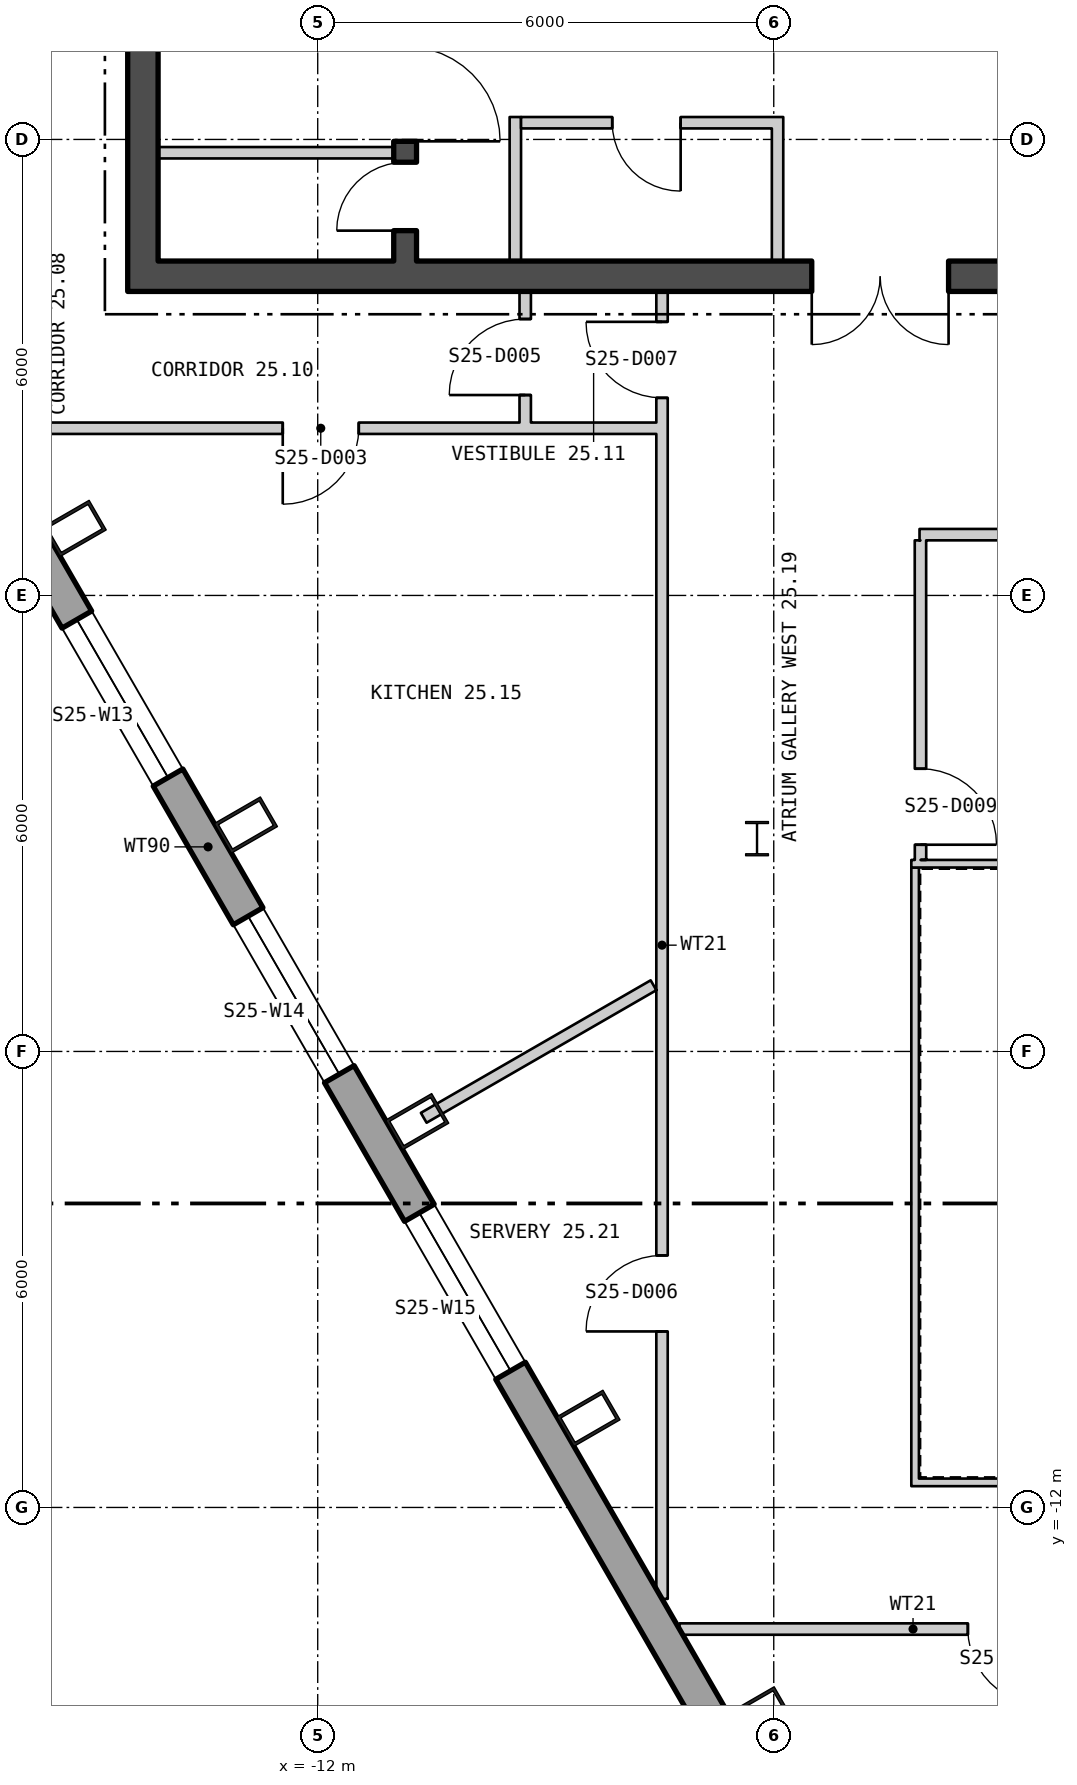
"""IFC4 building model, lengths in metres.
Left out: names, types, materials, properties, quantities, classifications, styles, units other than length and angle.
Written with IfcOpenShell. Run it as: python <this file> out.ifc"""

import sys

from ifc_helpers import new_model, si_unit, direction, frame, frame_2d, origin, origin_2d, place, context, subcontext, project, spatial, polyline, rectangle, hollow_rectangle, i_section, outline, extrude, element, fill, save


model = new_model("IFC4")
c1 = context("Model", 3, precision=1e-05, world=origin(), true_north=direction((0.0, 1.0)))
c2 = subcontext(c1, "Body", "Model", "MODEL_VIEW")
j1 = project(units=[si_unit("LENGTHUNIT", "METRE"), si_unit("PLANEANGLEUNIT", "RADIAN")], contexts=[c1])
p1 = place(None, origin())
s1 = spatial("IfcSite", under=j1, at=p1, CompositionType="ELEMENT")
p2 = place(p1, origin())
s2 = spatial("IfcBuilding", under=s1, at=p2, CompositionType="ELEMENT")
p3 = place(p2, frame((0.0, 0.0, 321.0)))
s3 = spatial("IfcBuildingStorey", under=s2, at=p3, CompositionType="ELEMENT", Elevation=321.0)
for number, where, z_axis, x_axis in (
    (1, (-15.198, 0.882, 0.0), (0.0, 0.0, 1.0), (0.5, -0.866, 0.0)),
    (2, (-12.945, -3.021, 0.0), (0.0, 0.0, 1.0), (0.5, -0.866, 0.0)),
    (3, (-10.691, -6.924, 0.0), (0.0, 0.0, 1.0), (0.5, -0.866, 0.0)),
    (4, (-8.438, -10.827, 0.0), (0.0, 0.0, 1.0), (0.5, -0.866, 0.0)),
    (5, (-6.185, -14.729, 0.0), (0.0, 0.0, 1.0), (0.5, -0.866, 0.0)),
):
    element("IfcColumn", number, at=place(p3, frame(where, z_axis=z_axis, x_axis=x_axis)), inside=s3, PredefinedType="COLUMN", context=c2, shape_type="SweptSolid", body=[
        extrude(hollow_rectangle(XDim=0.45, YDim=0.7, WallThickness=0.04, at=origin_2d()), origin(), (0.0, 0.0, 1.0), 4.2),
    ])
p4 = place(p3, frame((-6.22, -3.2, 0.0), z_axis=(0.0, 0.0, 1.0), x_axis=(1.0, 0.0, 0.0)))
e6 = element("IfcColumn", 6, at=p4, inside=s3, PredefinedType="COLUMN", context=c2, shape_type="SweptSolid", body=[
    extrude(i_section(OverallWidth=0.3, OverallDepth=0.45, WebThickness=0.014, FlangeThickness=0.026, at=origin_2d()), origin(), (0.0, 0.0, 1.0), 4.2),
])
p5 = place(p3, frame((-24.875, 16.493, -0.18), z_axis=(0.0, 0.0, 1.0), x_axis=(0.500000141277, -0.866025322218, 0.0)))
e7 = element("IfcWall", 7, at=p5, inside=s3, PredefinedType="SOLIDWALL", context=c2, shape_type="SweptSolid", body=[
    extrude(outline(polyline([(-0.13, -0.225), (45.86, -0.225), (45.6, 0.225), (0.13, 0.225), (-0.13, -0.225)])), origin(), (0.0, 0.0, 1.0), 3.98),
])
p6 = place(p5, frame((1.424, 0.0, 1.08)))
e8 = element("IfcOpeningElement", 8, at=p6, cuts=e7, PredefinedType="OPENING", context=c2, shape_type="SweptSolid", body=[
    extrude(rectangle(XDim=2.4, YDim=2.3, at=frame_2d((1.2, 1.15))), frame((0.0, 0.235, 0.0), z_axis=(0.0, -1.0, 0.0), x_axis=(1.0, 0.0, 0.0)), (0.0, 0.0, 1.0), 0.47),
])
p7 = place(p5, frame((5.892, 0.0, 1.08)))
e9 = element("IfcOpeningElement", 9, at=p7, cuts=e7, PredefinedType="OPENING", context=c2, shape_type="SweptSolid", body=[
    extrude(rectangle(XDim=2.4, YDim=2.3, at=frame_2d((1.2, 1.15))), frame((0.0, 0.235, 0.0), z_axis=(0.0, -1.0, 0.0), x_axis=(1.0, 0.0, 0.0)), (0.0, 0.0, 1.0), 0.47),
])
p8 = place(p5, frame((10.399, 0.0, 1.08)))
e10 = element("IfcOpeningElement", 10, at=p8, cuts=e7, PredefinedType="OPENING", context=c2, shape_type="SweptSolid", body=[
    extrude(rectangle(XDim=2.4, YDim=2.3, at=frame_2d((1.2, 1.15))), frame((0.0, 0.235, 0.0), z_axis=(0.0, -1.0, 0.0), x_axis=(1.0, 0.0, 0.0)), (0.0, 0.0, 1.0), 0.47),
])
p9 = place(p5, frame((14.905, 0.0, 1.08)))
e11 = element("IfcOpeningElement", 11, at=p9, cuts=e7, PredefinedType="OPENING", context=c2, shape_type="SweptSolid", body=[
    extrude(rectangle(XDim=2.4, YDim=2.3, at=frame_2d((1.2, 1.15))), frame((0.0, 0.235, 0.0), z_axis=(0.0, -1.0, 0.0), x_axis=(1.0, 0.0, 0.0)), (0.0, 0.0, 1.0), 0.47),
])
p10 = place(p5, frame((19.412, 0.0, 1.08)))
e12 = element("IfcOpeningElement", 12, at=p10, cuts=e7, PredefinedType="OPENING", context=c2, shape_type="SweptSolid", body=[
    extrude(rectangle(XDim=2.4, YDim=2.3, at=frame_2d((1.2, 1.15))), frame((0.0, 0.235, 0.0), z_axis=(0.0, -1.0, 0.0), x_axis=(1.0, 0.0, 0.0)), (0.0, 0.0, 1.0), 0.47),
])
p11 = place(p5, frame((23.918, 0.0, 1.08)))
e13 = element("IfcOpeningElement", 13, at=p11, cuts=e7, PredefinedType="OPENING", context=c2, shape_type="SweptSolid", body=[
    extrude(rectangle(XDim=2.4, YDim=2.3, at=frame_2d((1.2, 1.15))), frame((0.0, 0.235, 0.0), z_axis=(0.0, -1.0, 0.0), x_axis=(1.0, 0.0, 0.0)), (0.0, 0.0, 1.0), 0.47),
])
p12 = place(p5, frame((28.425, 0.0, 1.08)))
e14 = element("IfcOpeningElement", 14, at=p12, cuts=e7, PredefinedType="OPENING", context=c2, shape_type="SweptSolid", body=[
    extrude(rectangle(XDim=2.4, YDim=2.3, at=frame_2d((1.2, 1.15))), frame((0.0, 0.235, 0.0), z_axis=(0.0, -1.0, 0.0), x_axis=(1.0, 0.0, 0.0)), (0.0, 0.0, 1.0), 0.47),
])
p13 = place(p5, frame((37.438, 0.0, 1.08)))
e15 = element("IfcOpeningElement", 15, at=p13, cuts=e7, PredefinedType="OPENING", context=c2, shape_type="SweptSolid", body=[
    extrude(rectangle(XDim=2.4, YDim=2.3, at=frame_2d((1.2, 1.15))), frame((0.0, 0.235, 0.0), z_axis=(0.0, -1.0, 0.0), x_axis=(1.0, 0.0, 0.0)), (0.0, 0.0, 1.0), 0.47),
])
p14 = place(p5, frame((41.907, 0.0, 1.08)))
e16 = element("IfcOpeningElement", 16, at=p14, cuts=e7, PredefinedType="OPENING", context=c2, shape_type="SweptSolid", body=[
    extrude(rectangle(XDim=2.4, YDim=2.3, at=frame_2d((1.2, 1.15))), frame((0.0, 0.235, 0.0), z_axis=(0.0, -1.0, 0.0), x_axis=(1.0, 0.0, 0.0)), (0.0, 0.0, 1.0), 0.47),
])
for number, where, z_axis, x_axis in (
    (17, (-4.19, -11.67, 0.0), (0.0, 0.0, 1.0), (1.0, 0.0, 0.0)),
    (18, (4.19, -3.53, 0.0), (0.0, 0.0, 1.0), (-1.0, 0.0, 0.0)),
):
    element("IfcWall", number, at=place(p3, frame(where, z_axis=z_axis, x_axis=x_axis)), inside=s3, PredefinedType="PARTITIONING", context=c2, shape_type="SweptSolid", body=[
        extrude(rectangle(XDim=8.38, YDim=0.1, at=frame_2d((4.19, 0.0))), origin(), (0.0, 0.0, 1.0), 4.0),
    ])
p15 = place(p3, frame((-4.14, -3.58, 0.0), z_axis=(0.0, 0.0, 1.0), x_axis=(0.0, -1.0, 0.0)))
e19 = element("IfcWall", 19, at=p15, inside=s3, PredefinedType="PARTITIONING", context=c2, shape_type="SweptSolid", body=[
    extrude(rectangle(XDim=8.04, YDim=0.1, at=frame_2d((4.02, 0.0))), origin(), (0.0, 0.0, 1.0), 4.0),
])
p16 = place(p3, frame((-14.5, 4.2, 0.0), z_axis=(0.0, 0.0, 1.0), x_axis=(1.0, 0.0, 0.0)))
e20 = element("IfcWall", 20, at=p16, inside=s3, PredefinedType="SHEAR", context=c2, shape_type="SweptSolid", body=[
    extrude(rectangle(XDim=29.0, YDim=0.4, at=frame_2d((14.5, 0.0))), origin(), (0.0, 0.0, 1.0), 4.0),
])
p17 = place(p16, frame((9.0, 0.0, 0.0)))
e21 = element("IfcOpeningElement", 21, at=p17, cuts=e20, PredefinedType="OPENING", context=c2, shape_type="SweptSolid", body=[
    extrude(rectangle(XDim=1.8, YDim=2.4, at=frame_2d((0.9, 1.2))), frame((0.0, 0.21, 0.0), z_axis=(0.0, -1.0, 0.0), x_axis=(1.0, 0.0, 0.0)), (0.0, 0.0, 1.0), 0.42),
])
p18 = place(p16, frame((19.0, 0.0, 0.0)))
e22 = element("IfcOpeningElement", 22, at=p18, cuts=e20, PredefinedType="OPENING", context=c2, shape_type="SweptSolid", body=[
    extrude(rectangle(XDim=1.8, YDim=2.4, at=frame_2d((0.9, 1.2))), frame((0.0, 0.21, 0.0), z_axis=(0.0, -1.0, 0.0), x_axis=(1.0, 0.0, 0.0)), (0.0, 0.0, 1.0), 0.42),
])
p19 = place(p3, frame((-14.3, 4.4, 0.0), z_axis=(0.0, 0.0, 1.0), x_axis=(0.0, 1.0, 0.0)))
e23 = element("IfcWall", 23, at=p19, inside=s3, PredefinedType="SHEAR", context=c2, shape_type="SweptSolid", body=[
    extrude(rectangle(XDim=13.2, YDim=0.4, at=frame_2d((6.6, 0.0))), origin(), (0.0, 0.0, 1.0), 4.0),
])
p20 = place(p19, frame((3.05, 0.0, 0.0)))
e24 = element("IfcOpeningElement", 24, at=p20, cuts=e23, PredefinedType="OPENING", context=c2, shape_type="SweptSolid", body=[
    extrude(rectangle(XDim=1.5, YDim=2.1, at=frame_2d((0.75, 1.05))), frame((0.0, 0.21, 0.0), z_axis=(0.0, -1.0, 0.0), x_axis=(1.0, 0.0, 0.0)), (0.0, 0.0, 1.0), 0.42),
])
p21 = place(p3, frame((-10.85, 4.4, 0.0), z_axis=(0.0, 0.0, 1.0), x_axis=(0.0, 1.0, 0.0)))
e25 = element("IfcWall", 25, at=p21, inside=s3, PredefinedType="SHEAR", context=c2, shape_type="SweptSolid", body=[
    extrude(rectangle(XDim=13.2, YDim=0.3, at=frame_2d((6.6, 0.0))), origin(), (0.0, 0.0, 1.0), 4.0),
])
p22 = place(p21, frame((1.575, 0.0, 0.0)))
e26 = element("IfcOpeningElement", 26, at=p22, cuts=e25, PredefinedType="OPENING", context=c2, shape_type="SweptSolid", body=[
    extrude(rectangle(XDim=1.25, YDim=2.1, at=frame_2d((0.625, 1.05))), frame((0.0, 0.16, 0.0), z_axis=(0.0, -1.0, 0.0), x_axis=(1.0, 0.0, 0.0)), (0.0, 0.0, 1.0), 0.32),
])
p23 = place(p21, frame((0.4, 0.0, 0.0)))
e27 = element("IfcOpeningElement", 27, at=p23, cuts=e25, PredefinedType="OPENING", context=c2, shape_type="SweptSolid", body=[
    extrude(rectangle(XDim=0.9, YDim=2.1, at=frame_2d((0.45, 1.05))), frame((0.0, 0.16, 0.0), z_axis=(0.0, -1.0, 0.0), x_axis=(1.0, 0.0, 0.0)), (0.0, 0.0, 1.0), 0.32),
])
p24 = place(p3, frame((-14.1, 5.825, 0.0), z_axis=(0.0, 0.0, 1.0), x_axis=(1.0, 0.0, 0.0)))
e28 = element("IfcWall", 28, at=p24, inside=s3, PredefinedType="PARTITIONING", context=c2, shape_type="SweptSolid", body=[
    extrude(rectangle(XDim=3.1, YDim=0.15, at=frame_2d((1.55, 0.0))), origin(), (0.0, 0.0, 1.0), 4.0),
])
for number, where, z_axis, x_axis in (
    (29, (-9.4, 4.4, 0.0), (0.0, 0.0, 1.0), (0.0, 1.0, 0.0)),
    (30, (-5.95, 4.4, 0.0), (0.0, 0.0, 1.0), (0.0, 1.0, 0.0)),
):
    element("IfcWall", number, at=place(p3, frame(where, z_axis=z_axis, x_axis=x_axis)), inside=s3, PredefinedType="PARTITIONING", context=c2, shape_type="SweptSolid", body=[
        extrude(rectangle(XDim=1.895, YDim=0.15, at=frame_2d((0.948, 0.0))), origin(), (0.0, 0.0, 1.0), 4.0),
    ])
p25 = place(p3, frame((-9.325, 6.22, 0.0), z_axis=(0.0, 0.0, 1.0), x_axis=(1.0, 0.0, 0.0)))
e31 = element("IfcWall", 31, at=p25, inside=s3, PredefinedType="PARTITIONING", context=c2, shape_type="SweptSolid", body=[
    extrude(rectangle(XDim=3.3, YDim=0.15, at=frame_2d((1.65, 0.0))), origin(), (0.0, 0.0, 1.0), 4.0),
])
p26 = place(p25, frame((1.2, 0.0, 0.0)))
e32 = element("IfcOpeningElement", 32, at=p26, cuts=e31, PredefinedType="OPENING", context=c2, shape_type="SweptSolid", body=[
    extrude(rectangle(XDim=0.9, YDim=2.1, at=frame_2d((0.45, 1.05))), frame((0.0, 0.085, 0.0), z_axis=(0.0, -1.0, 0.0), x_axis=(1.0, 0.0, 0.0)), (0.0, 0.0, 1.0), 0.17),
])
p27 = place(p3, frame((-16.225, 2.2, 0.0), z_axis=(0.0, 0.0, 1.0), x_axis=(1.0, 0.0, 0.0)))
e33 = element("IfcWall", 33, at=p27, inside=s3, PredefinedType="PARTITIONING", context=c2, shape_type="SweptSolid", body=[
    extrude(rectangle(XDim=8.68, YDim=0.15, at=frame_2d((4.34, 0.0))), origin(), (0.0, 0.0, 1.0), 4.0),
])
p28 = place(p27, frame((3.765, 0.0, 0.0)))
e34 = element("IfcOpeningElement", 34, at=p28, cuts=e33, PredefinedType="OPENING", context=c2, shape_type="SweptSolid", body=[
    extrude(rectangle(XDim=1.0, YDim=2.1, at=frame_2d((0.5, 1.05))), frame((0.0, 0.085, 0.0), z_axis=(0.0, -1.0, 0.0), x_axis=(1.0, 0.0, 0.0)), (0.0, 0.0, 1.0), 0.17),
])
p29 = place(p3, frame((-10.605, -6.873, 0.0), z_axis=(0.0, 0.0, 1.0), x_axis=(0.866190356265, 0.499714185023, 0.0)))
e35 = element("IfcWall", 35, at=p29, inside=s3, PredefinedType="PARTITIONING", context=c2, shape_type="SweptSolid", body=[
    extrude(rectangle(XDim=3.49, YDim=0.15, at=frame_2d((1.745, 0.0))), origin(), (0.0, 0.0, 1.0), 4.0),
])
p30 = place(p3, frame((-9.27, 2.275, 0.0), z_axis=(0.0, 0.0, 1.0), x_axis=(0.0, 1.0, 0.0)))
e36 = element("IfcWall", 36, at=p30, inside=s3, PredefinedType="PARTITIONING", context=c2, shape_type="SweptSolid", body=[
    extrude(rectangle(XDim=1.725, YDim=0.15, at=frame_2d((0.863, 0.0))), origin(), (0.0, 0.0, 1.0), 4.0),
])
p31 = place(p30, frame((0.362, 0.0, 0.0)))
e37 = element("IfcOpeningElement", 37, at=p31, cuts=e36, PredefinedType="OPENING", context=c2, shape_type="SweptSolid", body=[
    extrude(rectangle(XDim=1.0, YDim=2.1, at=frame_2d((0.5, 1.05))), frame((0.0, 0.085, 0.0), z_axis=(0.0, -1.0, 0.0), x_axis=(1.0, 0.0, 0.0)), (0.0, 0.0, 1.0), 0.17),
])
p32 = place(p3, frame((-7.47, -13.203, 0.0), z_axis=(0.0, 0.0, 1.0), x_axis=(0.0, 1.0, 0.0)))
e38 = element("IfcWall", 38, at=p32, inside=s3, PredefinedType="PARTITIONING", context=c2, shape_type="SweptSolid", body=[
    extrude(rectangle(XDim=17.203, YDim=0.15, at=frame_2d((8.601, 0.0))), origin(), (0.0, 0.0, 1.0), 4.0),
])
p33 = place(p32, frame((3.519, 0.0, 0.0)))
e39 = element("IfcOpeningElement", 39, at=p33, cuts=e38, PredefinedType="OPENING", context=c2, shape_type="SweptSolid", body=[
    extrude(rectangle(XDim=1.0, YDim=2.1, at=frame_2d((0.5, 1.05))), frame((0.0, 0.085, 0.0), z_axis=(0.0, -1.0, 0.0), x_axis=(1.0, 0.0, 0.0)), (0.0, 0.0, 1.0), 0.17),
])
p34 = place(p32, frame((15.803, 0.0, 0.0)))
e40 = element("IfcOpeningElement", 40, at=p34, cuts=e38, PredefinedType="OPENING", context=c2, shape_type="SweptSolid", body=[
    extrude(rectangle(XDim=1.0, YDim=2.1, at=frame_2d((0.5, 1.05))), frame((0.0, 0.085, 0.0), z_axis=(0.0, -1.0, 0.0), x_axis=(1.0, 0.0, 0.0)), (0.0, 0.0, 1.0), 0.17),
])
p35 = place(p3, frame((-7.241, -13.6, 0.0), z_axis=(0.0, 0.0, 1.0), x_axis=(1.0, 0.0, 0.0)))
e41 = element("IfcWall", 41, at=p35, inside=s3, PredefinedType="PARTITIONING", context=c2, shape_type="SweptSolid", body=[
    extrude(rectangle(XDim=0.606, YDim=0.15, at=frame_2d((0.303, 0.0))), origin(), (0.0, 0.0, 1.0), 4.0),
])
p36 = place(p3, frame((-6.635, -13.6, 0.0), z_axis=(0.0, 0.0, 1.0), x_axis=(1.0, 0.0, 0.0)))
e42 = element("IfcWall", 42, at=p36, inside=s3, PredefinedType="PARTITIONING", context=c2, shape_type="SweptSolid", body=[
    extrude(rectangle(XDim=4.935, YDim=0.15, at=frame_2d((2.467, 0.0))), origin(), (0.0, 0.0, 1.0), 3.21),
])
p37 = place(p36, frame((3.189, 0.0, 0.0)))
e43 = element("IfcOpeningElement", 43, at=p37, cuts=e42, PredefinedType="OPENING", context=c2, shape_type="SweptSolid", body=[
    extrude(rectangle(XDim=1.0, YDim=2.1, at=frame_2d((0.5, 1.05))), frame((0.0, 0.085, 0.0), z_axis=(0.0, -1.0, 0.0), x_axis=(1.0, 0.0, 0.0)), (0.0, 0.0, 1.0), 0.17),
])
p38 = place(p3, frame((-4.082, 0.8, 0.0), z_axis=(0.0, 0.0, 1.0), x_axis=(1.0, 0.0, 0.0)))
e44 = element("IfcWall", 44, at=p38, inside=s3, PredefinedType="PARTITIONING", context=c2, shape_type="SweptSolid", body=[
    extrude(rectangle(XDim=8.163, YDim=0.15, at=frame_2d((4.082, 0.0))), origin(), (0.0, 0.0, 1.0), 4.0),
])
p39 = place(p3, frame((-4.07, 0.725, 0.0), z_axis=(0.0, 0.0, 1.0), x_axis=(0.000237812122, -0.999999971723, 0.0)))
e45 = element("IfcWall", 45, at=p39, inside=s3, PredefinedType="PARTITIONING", context=c2, shape_type="SweptSolid", body=[
    extrude(rectangle(XDim=4.205, YDim=0.15, at=frame_2d((2.103, 0.0))), origin(), (0.0, 0.0, 1.0), 4.0),
])
p40 = place(p39, frame((3.005, 0.0, 0.0)))
e46 = element("IfcOpeningElement", 46, at=p40, cuts=e45, PredefinedType="OPENING", context=c2, shape_type="SweptSolid", body=[
    extrude(rectangle(XDim=1.0, YDim=2.1, at=frame_2d((0.5, 1.05))), frame((0.0, 0.085, 0.0), z_axis=(0.0, -1.0, 0.0), x_axis=(1.0, 0.0, 0.0)), (0.0, 0.0, 1.0), 0.17),
])
p41 = place(p10, origin())
e47 = element("IfcWindow", 47, at=p41, inside=s3, PartitioningType="SINGLE_PANEL", PredefinedType="WINDOW", context=c2, shape_type="SweptSolid", body=[
    extrude(rectangle(XDim=2.4, YDim=2.3, at=frame_2d((1.2, 1.15))), frame((0.0, 0.105, 0.0), z_axis=(0.0, -1.0, 0.0), x_axis=(1.0, 0.0, 0.0)), (0.0, 0.0, 1.0), 0.06),
])
fill(e12, e47)
p42 = place(p11, origin())
e48 = element("IfcWindow", 48, at=p42, inside=s3, PartitioningType="SINGLE_PANEL", PredefinedType="WINDOW", context=c2, shape_type="SweptSolid", body=[
    extrude(rectangle(XDim=2.4, YDim=2.3, at=frame_2d((1.2, 1.15))), frame((0.0, 0.105, 0.0), z_axis=(0.0, -1.0, 0.0), x_axis=(1.0, 0.0, 0.0)), (0.0, 0.0, 1.0), 0.06),
])
fill(e13, e48)
p43 = place(p12, origin())
e49 = element("IfcWindow", 49, at=p43, inside=s3, PartitioningType="SINGLE_PANEL", PredefinedType="WINDOW", context=c2, shape_type="SweptSolid", body=[
    extrude(rectangle(XDim=2.4, YDim=2.3, at=frame_2d((1.2, 1.15))), frame((0.0, 0.105, 0.0), z_axis=(0.0, -1.0, 0.0), x_axis=(1.0, 0.0, 0.0)), (0.0, 0.0, 1.0), 0.06),
])
fill(e14, e49)
p44 = place(p22, origin())
e50 = element("IfcDoor", 50, at=p44, inside=s3, OperationType="SINGLE_SWING_LEFT", PredefinedType="DOOR", context=c2, shape_type="SweptSolid", body=[
    extrude(rectangle(XDim=1.25, YDim=2.1, at=frame_2d((0.625, 1.05))), frame((0.0, 0.025, 0.0), z_axis=(0.0, -1.0, 0.0), x_axis=(1.0, 0.0, 0.0)), (0.0, 0.0, 1.0), 0.05),
])
fill(e26, e50)
p45 = place(p23, origin())
e51 = element("IfcDoor", 51, at=p45, inside=s3, OperationType="SINGLE_SWING_RIGHT", PredefinedType="DOOR", context=c2, shape_type="SweptSolid", body=[
    extrude(rectangle(XDim=0.9, YDim=2.1, at=frame_2d((0.45, 1.05))), frame((0.0, 0.025, 0.0), z_axis=(0.0, -1.0, 0.0), x_axis=(1.0, 0.0, 0.0)), (0.0, 0.0, 1.0), 0.05),
])
fill(e27, e51)
p46 = place(p26, origin())
e52 = element("IfcDoor", 52, at=p46, inside=s3, OperationType="SINGLE_SWING_RIGHT", PredefinedType="DOOR", context=c2, shape_type="SweptSolid", body=[
    extrude(rectangle(XDim=0.9, YDim=2.1, at=frame_2d((0.45, 1.05))), frame((0.0, 0.025, 0.0), z_axis=(0.0, -1.0, 0.0), x_axis=(1.0, 0.0, 0.0)), (0.0, 0.0, 1.0), 0.05),
])
fill(e32, e52)
p47 = place(p17, origin())
e53 = element("IfcDoor", 53, at=p47, inside=s3, OperationType="DOUBLE_DOOR_SINGLE_SWING", PredefinedType="DOOR", context=c2, shape_type="SweptSolid", body=[
    extrude(rectangle(XDim=1.8, YDim=2.4, at=frame_2d((0.9, 1.2))), frame((0.0, 0.025, 0.0), z_axis=(0.0, -1.0, 0.0), x_axis=(1.0, 0.0, 0.0)), (0.0, 0.0, 1.0), 0.05),
])
fill(e21, e53)
p48 = place(p28, origin())
e54 = element("IfcDoor", 54, at=p48, inside=s3, OperationType="SINGLE_SWING_LEFT", PredefinedType="DOOR", context=c2, shape_type="SweptSolid", body=[
    extrude(rectangle(XDim=1.0, YDim=2.1, at=frame_2d((0.5, 1.05))), frame((0.0, 0.025, 0.0), z_axis=(0.0, -1.0, 0.0), x_axis=(1.0, 0.0, 0.0)), (0.0, 0.0, 1.0), 0.05),
])
fill(e34, e54)
p49 = place(p31, origin())
e55 = element("IfcDoor", 55, at=p49, inside=s3, OperationType="SINGLE_SWING_RIGHT", PredefinedType="DOOR", context=c2, shape_type="SweptSolid", body=[
    extrude(rectangle(XDim=1.0, YDim=2.1, at=frame_2d((0.5, 1.05))), frame((0.0, 0.025, 0.0), z_axis=(0.0, -1.0, 0.0), x_axis=(1.0, 0.0, 0.0)), (0.0, 0.0, 1.0), 0.05),
])
fill(e37, e55)
p50 = place(p33, origin())
e56 = element("IfcDoor", 56, at=p50, inside=s3, OperationType="SINGLE_SWING_RIGHT", PredefinedType="DOOR", context=c2, shape_type="SweptSolid", body=[
    extrude(rectangle(XDim=1.0, YDim=2.1, at=frame_2d((0.5, 1.05))), frame((0.0, 0.025, 0.0), z_axis=(0.0, -1.0, 0.0), x_axis=(1.0, 0.0, 0.0)), (0.0, 0.0, 1.0), 0.05),
])
fill(e39, e56)
p51 = place(p34, origin())
e57 = element("IfcDoor", 57, at=p51, inside=s3, OperationType="SINGLE_SWING_LEFT", PredefinedType="DOOR", context=c2, shape_type="SweptSolid", body=[
    extrude(rectangle(XDim=1.0, YDim=2.1, at=frame_2d((0.5, 1.05))), frame((0.0, 0.025, 0.0), z_axis=(0.0, -1.0, 0.0), x_axis=(1.0, 0.0, 0.0)), (0.0, 0.0, 1.0), 0.05),
])
fill(e40, e57)
p52 = place(p37, origin())
e58 = element("IfcDoor", 58, at=p52, inside=s3, OperationType="SINGLE_SWING_RIGHT", PredefinedType="DOOR", context=c2, shape_type="SweptSolid", body=[
    extrude(rectangle(XDim=1.0, YDim=2.1, at=frame_2d((0.5, 1.05))), frame((0.0, 0.025, 0.0), z_axis=(0.0, -1.0, 0.0), x_axis=(1.0, 0.0, 0.0)), (0.0, 0.0, 1.0), 0.05),
])
fill(e43, e58)
p53 = place(p40, origin())
e59 = element("IfcDoor", 59, at=p53, inside=s3, OperationType="SINGLE_SWING_LEFT", PredefinedType="DOOR", context=c2, shape_type="SweptSolid", body=[
    extrude(rectangle(XDim=1.0, YDim=2.1, at=frame_2d((0.5, 1.05))), frame((0.0, 0.025, 0.0), z_axis=(0.0, -1.0, 0.0), x_axis=(1.0, 0.0, 0.0)), (0.0, 0.0, 1.0), 0.05),
])
fill(e46, e59)
save(model, sys.argv[1])
